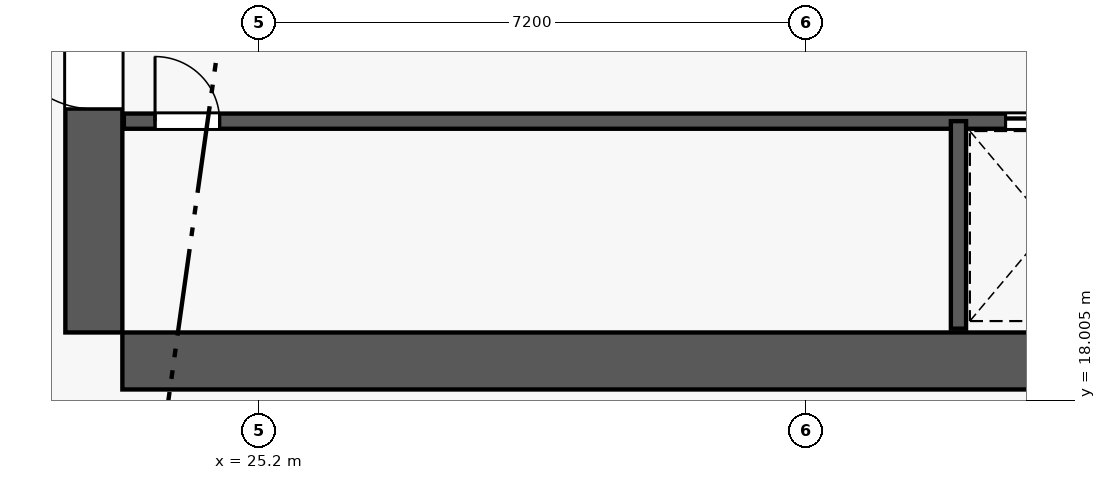
"""IFC4 building model, lengths in metres.
Left out: names, types, materials, properties, quantities, classifications, styles, units other than length and angle.
Written with IfcOpenShell. Run it as: python <this file> out.ifc"""

import sys

from ifc_helpers import new_model, si_unit, direction, frame, frame_2d, origin, origin_2d, place, context, subcontext, project, spatial, rectangle, extrude, element, fill, save


model = new_model("IFC4")
c1 = context("Model", 3, precision=1e-05, world=origin(), true_north=direction((0.0, 1.0)))
c2 = subcontext(c1, "Body", "Model", "MODEL_VIEW")
j1 = project(units=[si_unit("LENGTHUNIT", "METRE"), si_unit("PLANEANGLEUNIT", "RADIAN")], contexts=[c1])
p1 = place(None, origin())
s1 = spatial("IfcSite", under=j1, at=p1, CompositionType="ELEMENT")
p2 = place(p1, origin())
s2 = spatial("IfcBuilding", under=s1, at=p2, CompositionType="ELEMENT")
p3 = place(p2, frame((0.0, 0.0, 112.6)))
s3 = spatial("IfcBuildingStorey", under=s2, at=p3, CompositionType="ELEMENT", Elevation=112.6)
p4 = place(p3, frame((23.025, 18.525, 0.0), z_axis=(0.0, 0.0, 1.0), x_axis=(1.0, 0.0, 0.0)))
e1 = element("IfcColumn", 1, at=p4, inside=s3, PredefinedType="COLUMN", context=c2, shape_type="SweptSolid", body=[
    extrude(rectangle(XDim=0.75, YDim=0.75, at=origin_2d()), origin(), (0.0, 0.0, 1.0), 3.55),
])
p5 = place(p3, frame((23.4, 18.525, 0.0), z_axis=(0.0, 0.0, 1.0), x_axis=(1.0, 0.0, 0.0)))
e2 = element("IfcWall", 2, at=p5, inside=s3, PredefinedType="SHEAR", context=c2, shape_type="SweptSolid", body=[
    extrude(rectangle(XDim=18.0, YDim=0.75, at=frame_2d((9.0, 0.0))), origin(), (0.0, 0.0, 1.0), 3.34),
])
p6 = place(p3, frame((23.025, 18.9, 0.0), z_axis=(0.0, 0.0, 1.0), x_axis=(0.0, 1.0, 0.0)))
e3 = element("IfcWall", 3, at=p6, inside=s3, PredefinedType="SHEAR", context=c2, shape_type="SweptSolid", body=[
    extrude(rectangle(XDim=14.0, YDim=0.75, at=frame_2d((7.0, 0.0))), origin(), (0.0, 0.0, 1.0), 3.34),
])
p7 = place(p6, frame((2.94, 0.0, 0.0)))
e4 = element("IfcOpeningElement", 4, at=p7, cuts=e3, PredefinedType="OPENING", context=c2, shape_type="SweptSolid", body=[
    extrude(rectangle(XDim=1.22, YDim=2.25, at=frame_2d((0.61, 1.125))), frame((0.0, 0.385, 0.0), z_axis=(0.0, -1.0, 0.0), x_axis=(1.0, 0.0, 0.0)), (0.0, 0.0, 1.0), 0.77),
])
p8 = place(p3, frame((23.42, 21.68, 0.0), z_axis=(0.0, 0.0, 1.0), x_axis=(1.0, 0.0, 0.0)))
e5 = element("IfcWall", 5, at=p8, inside=s3, PredefinedType="PLUMBINGWALL", context=c2, shape_type="SweptSolid", body=[
    extrude(rectangle(XDim=17.96, YDim=0.2, at=frame_2d((8.98, 0.0))), origin(), (0.0, 0.0, 1.0), 3.34),
])
p9 = place(p8, frame((11.6, 0.0, 0.0)))
e6 = element("IfcOpeningElement", 6, at=p9, cuts=e5, PredefinedType="OPENING", context=c2, shape_type="SweptSolid", body=[
    extrude(rectangle(XDim=1.1, YDim=2.2, at=frame_2d((0.55, 1.1))), frame((0.0, 0.11, 0.0), z_axis=(0.0, -1.0, 0.0), x_axis=(1.0, 0.0, 0.0)), (0.0, 0.0, 1.0), 0.22),
])
p10 = place(p8, frame((0.41, 0.0, 0.0)))
e7 = element("IfcOpeningElement", 7, at=p10, cuts=e5, PredefinedType="OPENING", context=c2, shape_type="SweptSolid", body=[
    extrude(rectangle(XDim=0.85, YDim=2.05, at=frame_2d((0.425, 1.025))), frame((0.0, 0.11, 0.0), z_axis=(0.0, -1.0, 0.0), x_axis=(1.0, 0.0, 0.0)), (0.0, 0.0, 1.0), 0.22),
])
p11 = place(p8, frame((13.78, 0.0, 0.0)))
e8 = element("IfcOpeningElement", 8, at=p11, cuts=e5, PredefinedType="OPENING", context=c2, shape_type="SweptSolid", body=[
    extrude(rectangle(XDim=0.85, YDim=2.05, at=frame_2d((0.425, 1.025))), frame((0.0, 0.11, 0.0), z_axis=(0.0, -1.0, 0.0), x_axis=(1.0, 0.0, 0.0)), (0.0, 0.0, 1.0), 0.22),
])
p12 = place(p8, frame((16.13, 0.0, 0.0)))
e9 = element("IfcOpeningElement", 9, at=p12, cuts=e5, PredefinedType="OPENING", context=c2, shape_type="SweptSolid", body=[
    extrude(rectangle(XDim=0.85, YDim=2.05, at=frame_2d((0.425, 1.025))), frame((0.0, 0.11, 0.0), z_axis=(0.0, -1.0, 0.0), x_axis=(1.0, 0.0, 0.0)), (0.0, 0.0, 1.0), 0.22),
])
p13 = place(p3, frame((34.4, 18.95, 0.0), z_axis=(0.0, 0.0, 1.0), x_axis=(0.0, 1.0, 0.0)))
e10 = element("IfcWall", 10, at=p13, inside=s3, PredefinedType="PLUMBINGWALL", context=c2, shape_type="SweptSolid", body=[
    extrude(rectangle(XDim=2.73, YDim=0.2, at=frame_2d((1.365, 0.0))), origin(), (0.0, 0.0, 1.0), 3.34),
])
p14 = place(p7, origin())
e11 = element("IfcDoor", 11, at=p14, inside=s3, OperationType="SINGLE_SWING_RIGHT", PredefinedType="DOOR", context=c2, shape_type="SweptSolid", body=[
    extrude(rectangle(XDim=1.22, YDim=2.25, at=frame_2d((0.61, 1.125))), frame((0.0, 0.025, 0.0), z_axis=(0.0, -1.0, 0.0), x_axis=(1.0, 0.0, 0.0)), (0.0, 0.0, 1.0), 0.05),
])
fill(e4, e11)
p15 = place(p9, origin())
e12 = element("IfcDoor", 12, at=p15, inside=s3, OperationType="DOUBLE_DOOR_SLIDING", PredefinedType="DOOR", context=c2, shape_type="SweptSolid", body=[
    extrude(rectangle(XDim=1.1, YDim=2.2, at=frame_2d((0.55, 1.1))), frame((0.0, 0.025, 0.0), z_axis=(0.0, -1.0, 0.0), x_axis=(1.0, 0.0, 0.0)), (0.0, 0.0, 1.0), 0.05),
])
fill(e6, e12)
p16 = place(p10, origin())
e13 = element("IfcDoor", 13, at=p16, inside=s3, OperationType="SINGLE_SWING_LEFT", PredefinedType="DOOR", context=c2, shape_type="SweptSolid", body=[
    extrude(rectangle(XDim=0.85, YDim=2.05, at=frame_2d((0.425, 1.025))), frame((0.0, 0.025, 0.0), z_axis=(0.0, -1.0, 0.0), x_axis=(1.0, 0.0, 0.0)), (0.0, 0.0, 1.0), 0.05),
])
fill(e7, e13)
save(model, sys.argv[1])
